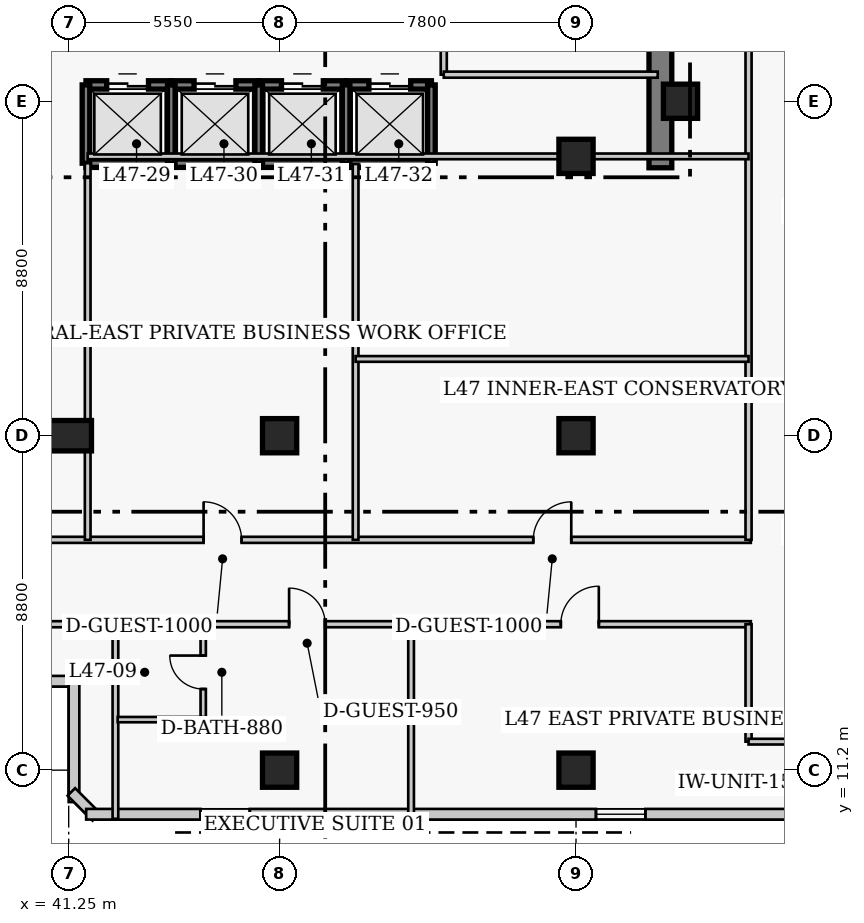
"""IFC4 building model, lengths in metres.
Left out: names, types, materials, properties, quantities, classifications, styles, units other than length and angle.
Written with IfcOpenShell. Run it as: python <this file> out.ifc"""

import sys

from ifc_helpers import new_model, si_unit, direction, frame, frame_2d, origin, origin_2d, place, context, subcontext, project, spatial, rectangle, extrude, element, fill, save


model = new_model("IFC4")
c1 = context("Model", 3, precision=1e-05, world=origin(), true_north=direction((0.0, 1.0)))
c2 = subcontext(c1, "Body", "Model", "MODEL_VIEW")
j1 = project(units=[si_unit("LENGTHUNIT", "METRE"), si_unit("PLANEANGLEUNIT", "RADIAN")], contexts=[c1])
p1 = place(None, origin())
s1 = spatial("IfcSite", under=j1, at=p1, CompositionType="ELEMENT")
p2 = place(p1, origin())
s2 = spatial("IfcBuilding", under=s1, at=p2, CompositionType="ELEMENT")
p3 = place(p2, frame((0.0, 0.0, 189.0)))
s3 = spatial("IfcBuildingStorey", under=s2, at=p3, CompositionType="ELEMENT", Elevation=189.0)
p4 = place(p3, frame((56.82, 27.05, 0.0), z_axis=(0.0, 0.0, 1.0), x_axis=(0.0, 1.0, 0.0)))
e1 = element("IfcWall", 1, at=p4, inside=s3, PredefinedType="SHEAR", context=c2, shape_type="SweptSolid", body=[
    extrude(rectangle(XDim=13.57, YDim=0.6, at=frame_2d((6.785, 0.0))), origin(), (0.0, 0.0, 1.0), 3.9),
])
p5 = place(p3, frame((41.25, 20.0, 0.0), z_axis=(0.0, 0.0, 1.0), x_axis=(1.0, 0.0, 0.0)))
e2 = element("IfcColumn", 2, at=p5, inside=s3, PredefinedType="COLUMN", context=c2, shape_type="SweptSolid", body=[
    extrude(rectangle(XDim=1.2, YDim=0.8, at=origin_2d()), origin(), (0.0, 0.0, 1.0), 3.9),
])
for number, where, z_axis, x_axis in (
    (3, (46.8, 11.2, 0.0), (0.0, 0.0, 1.0), (1.0, 0.0, 0.0)),
    (4, (46.8, 20.0, 0.0), (0.0, 0.0, 1.0), (1.0, 0.0, 0.0)),
    (5, (54.6, 11.2, 0.0), (0.0, 0.0, 1.0), (1.0, 0.0, 0.0)),
    (6, (54.6, 20.0, 0.0), (0.0, 0.0, 1.0), (1.0, 0.0, 0.0)),
    (7, (57.35, 28.8, 0.0), (0.0, 0.0, 1.0), (1.0, 0.0, 0.0)),
    (8, (54.6, 27.35, 0.0), (0.0, 0.0, 1.0), (1.0, 0.0, 0.0)),
):
    element("IfcColumn", number, at=place(p3, frame(where, z_axis=z_axis, x_axis=x_axis)), inside=s3, PredefinedType="COLUMN", context=c2, shape_type="SweptSolid", body=[
        extrude(rectangle(XDim=0.9, YDim=0.9, at=origin_2d()), origin(), (0.0, 0.0, 1.0), 3.9),
    ])
p6 = place(p3, frame((36.61, 13.54, 0.0), z_axis=(0.0, 0.0, 1.0), x_axis=(1.0, 0.0, 0.0)))
e9 = element("IfcWall", 9, at=p6, inside=s3, PredefinedType="SOLIDWALL", context=c2, shape_type="SweptSolid", body=[
    extrude(rectangle(XDim=4.78, YDim=0.28, at=frame_2d((2.39, 0.0))), origin(), (0.0, 0.0, 1.0), 3.65),
])
p7 = place(p6, frame((1.74, 0.0, 0.85)))
e10 = element("IfcOpeningElement", 10, at=p7, cuts=e9, PredefinedType="OPENING", context=c2, shape_type="SweptSolid", body=[
    extrude(rectangle(XDim=1.3, YDim=1.7, at=frame_2d((0.65, 0.85))), frame((0.0, 0.15, 0.0), z_axis=(0.0, -1.0, 0.0), x_axis=(1.0, 0.0, 0.0)), (0.0, 0.0, 1.0), 0.3),
])
p8 = place(p3, frame((41.39, 13.54, 0.0), z_axis=(0.0, 0.0, 1.0), x_axis=(0.0, -1.0, 0.0)))
e11 = element("IfcWall", 11, at=p8, inside=s3, PredefinedType="SOLIDWALL", context=c2, shape_type="SweptSolid", body=[
    extrude(rectangle(XDim=3.18, YDim=0.28, at=frame_2d((1.59, 0.0))), origin(), (0.0, 0.0, 1.0), 3.65),
])
p9 = place(p3, frame((41.321, 10.627, 0.0), z_axis=(0.0, 0.0, 1.0), x_axis=(0.707106781187, -0.707106781187, 0.0)))
e12 = element("IfcWall", 12, at=p9, inside=s3, PredefinedType="SOLIDWALL", context=c2, shape_type="SweptSolid", body=[
    extrude(rectangle(XDim=0.928, YDim=0.28, at=frame_2d((0.464, 0.0))), origin(), (0.0, 0.0, 1.0), 3.65),
])
p10 = place(p3, frame((41.71, 10.04, 0.0), z_axis=(0.0, 0.0, 1.0), x_axis=(1.0, 0.0, 0.0)))
e13 = element("IfcWall", 13, at=p10, inside=s3, PredefinedType="SOLIDWALL", context=c2, shape_type="SweptSolid", body=[
    extrude(rectangle(XDim=25.83, YDim=0.28, at=frame_2d((12.915, 0.0))), origin(), (0.0, 0.0, 1.0), 3.65),
])
p11 = place(p10, frame((3.005, 0.0, 0.85)))
e14 = element("IfcOpeningElement", 14, at=p11, cuts=e13, PredefinedType="OPENING", context=c2, shape_type="SweptSolid", body=[
    extrude(rectangle(XDim=1.3, YDim=1.7, at=frame_2d((0.65, 0.85))), frame((0.0, 0.15, 0.0), z_axis=(0.0, -1.0, 0.0), x_axis=(1.0, 0.0, 0.0)), (0.0, 0.0, 1.0), 0.3),
])
p12 = place(p10, frame((13.415, 0.0, 0.85)))
e15 = element("IfcOpeningElement", 15, at=p12, cuts=e13, PredefinedType="OPENING", context=c2, shape_type="SweptSolid", body=[
    extrude(rectangle(XDim=1.3, YDim=1.7, at=frame_2d((0.65, 0.85))), frame((0.0, 0.15, 0.0), z_axis=(0.0, -1.0, 0.0), x_axis=(1.0, 0.0, 0.0)), (0.0, 0.0, 1.0), 0.3),
])
p13 = place(p10, frame((21.525, 0.0, 0.85)))
e16 = element("IfcOpeningElement", 16, at=p13, cuts=e13, PredefinedType="OPENING", context=c2, shape_type="SweptSolid", body=[
    extrude(rectangle(XDim=1.3, YDim=1.7, at=frame_2d((0.65, 0.85))), frame((0.0, 0.15, 0.0), z_axis=(0.0, -1.0, 0.0), x_axis=(1.0, 0.0, 0.0)), (0.0, 0.0, 1.0), 0.3),
])
p14 = place(p3, frame((41.705, 29.23, 0.0), z_axis=(0.0, 0.0, 1.0), x_axis=(1.0, 0.0, 0.0)))
e17 = element("IfcWall", 17, at=p14, inside=s3, PredefinedType="SHEAR", context=c2, shape_type="SweptSolid", body=[
    extrude(rectangle(XDim=2.245, YDim=0.22, at=frame_2d((1.123, 0.0))), origin(), (0.0, 0.0, 1.0), 3.9),
])
p15 = place(p14, frame((0.545, 0.0, 0.0)))
e18 = element("IfcOpeningElement", 18, at=p15, cuts=e17, PredefinedType="OPENING", context=c2, shape_type="SweptSolid", body=[
    extrude(rectangle(XDim=1.1, YDim=2.15, at=frame_2d((0.55, 1.075))), frame((0.0, 0.12, 0.0), z_axis=(0.0, -1.0, 0.0), x_axis=(1.0, 0.0, 0.0)), (0.0, 0.0, 1.0), 0.24),
])
p16 = place(p3, frame((41.705, 27.17, 0.0), z_axis=(0.0, 0.0, 1.0), x_axis=(1.0, 0.0, 0.0)))
e19 = element("IfcWall", 19, at=p16, inside=s3, PredefinedType="SHEAR", context=c2, shape_type="SweptSolid", body=[
    extrude(rectangle(XDim=2.245, YDim=0.22, at=frame_2d((1.123, 0.0))), origin(), (0.0, 0.0, 1.0), 3.9),
])
p17 = place(p3, frame((41.705, 27.17, 0.0), z_axis=(0.0, 0.0, 1.0), x_axis=(0.0, 1.0, 0.0)))
e20 = element("IfcWall", 20, at=p17, inside=s3, PredefinedType="SHEAR", context=c2, shape_type="SweptSolid", body=[
    extrude(rectangle(XDim=2.06, YDim=0.2, at=frame_2d((1.03, 0.0))), origin(), (0.0, 0.0, 1.0), 3.9),
])
p18 = place(p3, frame((43.95, 29.23, 0.0), z_axis=(0.0, 0.0, 1.0), x_axis=(1.0, 0.0, 0.0)))
e21 = element("IfcWall", 21, at=p18, inside=s3, PredefinedType="SHEAR", context=c2, shape_type="SweptSolid", body=[
    extrude(rectangle(XDim=2.3, YDim=0.22, at=frame_2d((1.15, 0.0))), origin(), (0.0, 0.0, 1.0), 3.9),
])
p19 = place(p18, frame((0.6, 0.0, 0.0)))
e22 = element("IfcOpeningElement", 22, at=p19, cuts=e21, PredefinedType="OPENING", context=c2, shape_type="SweptSolid", body=[
    extrude(rectangle(XDim=1.1, YDim=2.15, at=frame_2d((0.55, 1.075))), frame((0.0, 0.12, 0.0), z_axis=(0.0, -1.0, 0.0), x_axis=(1.0, 0.0, 0.0)), (0.0, 0.0, 1.0), 0.24),
])
p20 = place(p3, frame((43.95, 27.17, 0.0), z_axis=(0.0, 0.0, 1.0), x_axis=(1.0, 0.0, 0.0)))
e23 = element("IfcWall", 23, at=p20, inside=s3, PredefinedType="SHEAR", context=c2, shape_type="SweptSolid", body=[
    extrude(rectangle(XDim=2.3, YDim=0.22, at=frame_2d((1.15, 0.0))), origin(), (0.0, 0.0, 1.0), 3.9),
])
p21 = place(p3, frame((43.95, 27.17, 0.0), z_axis=(0.0, 0.0, 1.0), x_axis=(0.0, 1.0, 0.0)))
e24 = element("IfcWall", 24, at=p21, inside=s3, PredefinedType="SHEAR", context=c2, shape_type="SweptSolid", body=[
    extrude(rectangle(XDim=2.06, YDim=0.2, at=frame_2d((1.03, 0.0))), origin(), (0.0, 0.0, 1.0), 3.9),
])
p22 = place(p3, frame((46.25, 29.23, 0.0), z_axis=(0.0, 0.0, 1.0), x_axis=(1.0, 0.0, 0.0)))
e25 = element("IfcWall", 25, at=p22, inside=s3, PredefinedType="SHEAR", context=c2, shape_type="SweptSolid", body=[
    extrude(rectangle(XDim=2.3, YDim=0.22, at=frame_2d((1.15, 0.0))), origin(), (0.0, 0.0, 1.0), 3.9),
])
p23 = place(p22, frame((0.6, 0.0, 0.0)))
e26 = element("IfcOpeningElement", 26, at=p23, cuts=e25, PredefinedType="OPENING", context=c2, shape_type="SweptSolid", body=[
    extrude(rectangle(XDim=1.1, YDim=2.15, at=frame_2d((0.55, 1.075))), frame((0.0, 0.12, 0.0), z_axis=(0.0, -1.0, 0.0), x_axis=(1.0, 0.0, 0.0)), (0.0, 0.0, 1.0), 0.24),
])
p24 = place(p3, frame((46.25, 27.17, 0.0), z_axis=(0.0, 0.0, 1.0), x_axis=(1.0, 0.0, 0.0)))
e27 = element("IfcWall", 27, at=p24, inside=s3, PredefinedType="SHEAR", context=c2, shape_type="SweptSolid", body=[
    extrude(rectangle(XDim=2.3, YDim=0.22, at=frame_2d((1.15, 0.0))), origin(), (0.0, 0.0, 1.0), 3.9),
])
p25 = place(p3, frame((46.25, 27.17, 0.0), z_axis=(0.0, 0.0, 1.0), x_axis=(0.0, 1.0, 0.0)))
e28 = element("IfcWall", 28, at=p25, inside=s3, PredefinedType="SHEAR", context=c2, shape_type="SweptSolid", body=[
    extrude(rectangle(XDim=2.06, YDim=0.2, at=frame_2d((1.03, 0.0))), origin(), (0.0, 0.0, 1.0), 3.9),
])
p26 = place(p3, frame((48.55, 29.23, 0.0), z_axis=(0.0, 0.0, 1.0), x_axis=(1.0, 0.0, 0.0)))
e29 = element("IfcWall", 29, at=p26, inside=s3, PredefinedType="SHEAR", context=c2, shape_type="SweptSolid", body=[
    extrude(rectangle(XDim=2.245, YDim=0.22, at=frame_2d((1.123, 0.0))), origin(), (0.0, 0.0, 1.0), 3.9),
])
p27 = place(p26, frame((0.6, 0.0, 0.0)))
e30 = element("IfcOpeningElement", 30, at=p27, cuts=e29, PredefinedType="OPENING", context=c2, shape_type="SweptSolid", body=[
    extrude(rectangle(XDim=1.1, YDim=2.15, at=frame_2d((0.55, 1.075))), frame((0.0, 0.12, 0.0), z_axis=(0.0, -1.0, 0.0), x_axis=(1.0, 0.0, 0.0)), (0.0, 0.0, 1.0), 0.24),
])
p28 = place(p3, frame((48.55, 27.17, 0.0), z_axis=(0.0, 0.0, 1.0), x_axis=(1.0, 0.0, 0.0)))
e31 = element("IfcWall", 31, at=p28, inside=s3, PredefinedType="SHEAR", context=c2, shape_type="SweptSolid", body=[
    extrude(rectangle(XDim=2.245, YDim=0.22, at=frame_2d((1.123, 0.0))), origin(), (0.0, 0.0, 1.0), 3.9),
])
for number, where, z_axis, x_axis in (
    (32, (48.55, 27.17, 0.0), (0.0, 0.0, 1.0), (0.0, 1.0, 0.0)),
    (33, (50.795, 27.17, 0.0), (0.0, 0.0, 1.0), (0.0, 1.0, 0.0)),
):
    element("IfcWall", number, at=place(p3, frame(where, z_axis=z_axis, x_axis=x_axis)), inside=s3, PredefinedType="SHEAR", context=c2, shape_type="SweptSolid", body=[
        extrude(rectangle(XDim=2.06, YDim=0.2, at=frame_2d((1.03, 0.0))), origin(), (0.0, 0.0, 1.0), 3.9),
    ])
p29 = place(p3, frame((51.12, 29.5, 0.0), z_axis=(0.0, 0.0, 1.0), x_axis=(0.0, 1.0, 0.0)))
e34 = element("IfcWall", 34, at=p29, inside=s3, PredefinedType="PARTITIONING", context=c2, shape_type="SweptSolid", body=[
    extrude(rectangle(XDim=3.7, YDim=0.16, at=frame_2d((1.85, 0.0))), origin(), (0.0, 0.0, 1.0), 3.65),
])
p30 = place(p29, frame((0.9, 0.0, 0.0)))
e35 = element("IfcOpeningElement", 35, at=p30, cuts=e34, PredefinedType="OPENING", context=c2, shape_type="SweptSolid", body=[
    extrude(rectangle(XDim=1.1, YDim=2.15, at=frame_2d((0.55, 1.075))), frame((0.0, 0.09, 0.0), z_axis=(0.0, -1.0, 0.0), x_axis=(1.0, 0.0, 0.0)), (0.0, 0.0, 1.0), 0.18),
])
p31 = place(p3, frame((51.12, 29.5, 0.0), z_axis=(0.0, 0.0, 1.0), x_axis=(1.0, 0.0, 0.0)))
e36 = element("IfcWall", 36, at=p31, inside=s3, PredefinedType="PARTITIONING", context=c2, shape_type="SweptSolid", body=[
    extrude(rectangle(XDim=5.63, YDim=0.16, at=frame_2d((2.815, 0.0))), origin(), (0.0, 0.0, 1.0), 3.65),
])
p32 = place(p3, frame((35.85, 17.26, 0.0), z_axis=(0.0, 0.0, 1.0), x_axis=(1.0, 0.0, 0.0)))
e37 = element("IfcWall", 37, at=p32, inside=s3, PredefinedType="PARTITIONING", context=c2, shape_type="SweptSolid", body=[
    extrude(rectangle(XDim=23.35, YDim=0.16, at=frame_2d((11.675, 0.0))), origin(), (0.0, 0.0, 1.0), 3.65),
])
p33 = place(p32, frame((8.95, 0.0, 0.0)))
e38 = element("IfcOpeningElement", 38, at=p33, cuts=e37, PredefinedType="OPENING", context=c2, shape_type="SweptSolid", body=[
    extrude(rectangle(XDim=1.0, YDim=2.15, at=frame_2d((0.5, 1.075))), frame((0.0, 0.09, 0.0), z_axis=(0.0, -1.0, 0.0), x_axis=(1.0, 0.0, 0.0)), (0.0, 0.0, 1.0), 0.18),
])
p34 = place(p32, frame((17.625, 0.0, 0.0)))
e39 = element("IfcOpeningElement", 39, at=p34, cuts=e37, PredefinedType="OPENING", context=c2, shape_type="SweptSolid", body=[
    extrude(rectangle(XDim=1.0, YDim=2.15, at=frame_2d((0.5, 1.075))), frame((0.0, 0.09, 0.0), z_axis=(0.0, -1.0, 0.0), x_axis=(1.0, 0.0, 0.0)), (0.0, 0.0, 1.0), 0.18),
])
p35 = place(p3, frame((35.8, 15.04, 0.0), z_axis=(0.0, 0.0, 1.0), x_axis=(1.0, 0.0, 0.0)))
e40 = element("IfcWall", 40, at=p35, inside=s3, PredefinedType="PARTITIONING", context=c2, shape_type="SweptSolid", body=[
    extrude(rectangle(XDim=23.4, YDim=0.16, at=frame_2d((11.7, 0.0))), origin(), (0.0, 0.0, 1.0), 3.65),
])
p36 = place(p35, frame((11.25, 0.0, 0.0)))
e41 = element("IfcOpeningElement", 41, at=p36, cuts=e40, PredefinedType="OPENING", context=c2, shape_type="SweptSolid", body=[
    extrude(rectangle(XDim=0.95, YDim=2.1, at=frame_2d((0.475, 1.05))), frame((0.0, 0.09, 0.0), z_axis=(0.0, -1.0, 0.0), x_axis=(1.0, 0.0, 0.0)), (0.0, 0.0, 1.0), 0.18),
])
p37 = place(p35, frame((18.4, 0.0, 0.0)))
e42 = element("IfcOpeningElement", 42, at=p37, cuts=e40, PredefinedType="OPENING", context=c2, shape_type="SweptSolid", body=[
    extrude(rectangle(XDim=1.0, YDim=2.15, at=frame_2d((0.5, 1.075))), frame((0.0, 0.09, 0.0), z_axis=(0.0, -1.0, 0.0), x_axis=(1.0, 0.0, 0.0)), (0.0, 0.0, 1.0), 0.18),
])
p38 = place(p3, frame((59.14, 17.26, 0.0), z_axis=(0.0, 0.0, 1.0), x_axis=(0.0, 1.0, 0.0)))
e43 = element("IfcWall", 43, at=p38, inside=s3, PredefinedType="PARTITIONING", context=c2, shape_type="SweptSolid", body=[
    extrude(rectangle(XDim=23.39, YDim=0.16, at=frame_2d((11.695, 0.0))), origin(), (0.0, 0.0, 1.0), 3.65),
])
p39 = place(p3, frame((59.14, 11.95, 0.0), z_axis=(0.0, 0.0, 1.0), x_axis=(0.0, 1.0, 0.0)))
e44 = element("IfcWall", 44, at=p39, inside=s3, PredefinedType="PARTITIONING", context=c2, shape_type="SweptSolid", body=[
    extrude(rectangle(XDim=3.09, YDim=0.16, at=frame_2d((1.545, 0.0))), origin(), (0.0, 0.0, 1.0), 3.65),
])
p40 = place(p3, frame((59.14, 11.95, 0.0), z_axis=(0.0, 0.0, 1.0), x_axis=(1.0, 0.0, 0.0)))
e45 = element("IfcWall", 45, at=p40, inside=s3, PredefinedType="PARTITIONING", context=c2, shape_type="SweptSolid", body=[
    extrude(rectangle(XDim=2.22, YDim=0.15, at=frame_2d((1.11, 0.0))), origin(), (0.0, 0.0, 1.0), 3.65),
])
p41 = place(p3, frame((41.75, 17.26, 0.0), z_axis=(0.0, 0.0, 1.0), x_axis=(0.0, 1.0, 0.0)))
e46 = element("IfcWall", 46, at=p41, inside=s3, PredefinedType="PARTITIONING", context=c2, shape_type="SweptSolid", body=[
    extrude(rectangle(XDim=9.91, YDim=0.15, at=frame_2d((4.955, 0.0))), origin(), (0.0, 0.0, 1.0), 3.65),
])
p42 = place(p3, frame((48.8, 17.26, 0.0), z_axis=(0.0, 0.0, 1.0), x_axis=(0.0, 1.0, 0.0)))
e47 = element("IfcWall", 47, at=p42, inside=s3, PredefinedType="PARTITIONING", context=c2, shape_type="SweptSolid", body=[
    extrude(rectangle(XDim=9.89, YDim=0.15, at=frame_2d((4.945, 0.0))), origin(), (0.0, 0.0, 1.0), 3.65),
])
p43 = place(p3, frame((41.75, 27.35, 0.0), z_axis=(0.0, 0.0, 1.0), x_axis=(1.0, 0.0, 0.0)))
e48 = element("IfcWall", 48, at=p43, inside=s3, PredefinedType="PARTITIONING", context=c2, shape_type="SweptSolid", body=[
    extrude(rectangle(XDim=17.39, YDim=0.15, at=frame_2d((8.695, 0.0))), origin(), (0.0, 0.0, 1.0), 3.65),
])
p44 = place(p3, frame((48.8, 22.02, 0.0), z_axis=(0.0, 0.0, 1.0), x_axis=(1.0, 0.0, 0.0)))
e49 = element("IfcWall", 49, at=p44, inside=s3, PredefinedType="PARTITIONING", context=c2, shape_type="SweptSolid", body=[
    extrude(rectangle(XDim=10.34, YDim=0.15, at=frame_2d((5.17, 0.0))), origin(), (0.0, 0.0, 1.0), 3.65),
])
p45 = place(p3, frame((42.48, 9.92, 0.0), z_axis=(0.0, 0.0, 1.0), x_axis=(0.0, 1.0, 0.0)))
e50 = element("IfcWall", 50, at=p45, inside=s3, PredefinedType="PARTITIONING", context=c2, shape_type="SweptSolid", body=[
    extrude(rectangle(XDim=5.12, YDim=0.15, at=frame_2d((2.56, 0.0))), origin(), (0.0, 0.0, 1.0), 3.65),
])
p46 = place(p3, frame((44.79, 12.53, 0.0), z_axis=(0.0, 0.0, 1.0), x_axis=(0.0, 1.0, 0.0)))
e51 = element("IfcWall", 51, at=p46, inside=s3, PredefinedType="PLUMBINGWALL", context=c2, shape_type="SweptSolid", body=[
    extrude(rectangle(XDim=2.49, YDim=0.14, at=frame_2d((1.245, 0.0))), origin(), (0.0, 0.0, 1.0), 3.65),
])
p47 = place(p46, frame((0.805, 0.0, 0.0)))
e52 = element("IfcOpeningElement", 52, at=p47, cuts=e51, PredefinedType="OPENING", context=c2, shape_type="SweptSolid", body=[
    extrude(rectangle(XDim=0.88, YDim=2.05, at=frame_2d((0.44, 1.025))), frame((0.0, 0.08, 0.0), z_axis=(0.0, -1.0, 0.0), x_axis=(1.0, 0.0, 0.0)), (0.0, 0.0, 1.0), 0.16),
])
p48 = place(p3, frame((42.54, 12.53, 0.0), z_axis=(0.0, 0.0, 1.0), x_axis=(1.0, 0.0, 0.0)))
e53 = element("IfcWall", 53, at=p48, inside=s3, PredefinedType="PLUMBINGWALL", context=c2, shape_type="SweptSolid", body=[
    extrude(rectangle(XDim=2.25, YDim=0.14, at=frame_2d((1.125, 0.0))), origin(), (0.0, 0.0, 1.0), 3.65),
])
p49 = place(p3, frame((50.26, 9.92, 0.0), z_axis=(0.0, 0.0, 1.0), x_axis=(0.0, 1.0, 0.0)))
e54 = element("IfcWall", 54, at=p49, inside=s3, PredefinedType="PARTITIONING", context=c2, shape_type="SweptSolid", body=[
    extrude(rectangle(XDim=5.12, YDim=0.15, at=frame_2d((2.56, 0.0))), origin(), (0.0, 0.0, 1.0), 3.65),
])
p50 = place(p11, origin())
e55 = element("IfcWindow", 55, at=p50, inside=s3, PartitioningType="SINGLE_PANEL", PredefinedType="WINDOW", context=c2, shape_type="SweptSolid", body=[
    extrude(rectangle(XDim=1.3, YDim=1.7, at=frame_2d((0.65, 0.85))), frame((0.0, 0.03, 0.0), z_axis=(0.0, -1.0, 0.0), x_axis=(1.0, 0.0, 0.0)), (0.0, 0.0, 1.0), 0.06),
])
fill(e14, e55)
p51 = place(p12, origin())
e56 = element("IfcWindow", 56, at=p51, inside=s3, PartitioningType="SINGLE_PANEL", PredefinedType="WINDOW", context=c2, shape_type="SweptSolid", body=[
    extrude(rectangle(XDim=1.3, YDim=1.7, at=frame_2d((0.65, 0.85))), frame((0.0, 0.03, 0.0), z_axis=(0.0, -1.0, 0.0), x_axis=(1.0, 0.0, 0.0)), (0.0, 0.0, 1.0), 0.06),
])
fill(e15, e56)
p52 = place(p15, origin())
e57 = element("IfcDoor", 57, at=p52, inside=s3, OperationType="DOUBLE_DOOR_SLIDING", PredefinedType="DOOR", context=c2, shape_type="SweptSolid", body=[
    extrude(rectangle(XDim=1.1, YDim=2.15, at=frame_2d((0.55, 1.075))), frame((0.0, 0.025, 0.0), z_axis=(0.0, -1.0, 0.0), x_axis=(1.0, 0.0, 0.0)), (0.0, 0.0, 1.0), 0.05),
])
fill(e18, e57)
p53 = place(p19, origin())
e58 = element("IfcDoor", 58, at=p53, inside=s3, OperationType="DOUBLE_DOOR_SLIDING", PredefinedType="DOOR", context=c2, shape_type="SweptSolid", body=[
    extrude(rectangle(XDim=1.1, YDim=2.15, at=frame_2d((0.55, 1.075))), frame((0.0, 0.025, 0.0), z_axis=(0.0, -1.0, 0.0), x_axis=(1.0, 0.0, 0.0)), (0.0, 0.0, 1.0), 0.05),
])
fill(e22, e58)
p54 = place(p23, origin())
e59 = element("IfcDoor", 59, at=p54, inside=s3, OperationType="DOUBLE_DOOR_SLIDING", PredefinedType="DOOR", context=c2, shape_type="SweptSolid", body=[
    extrude(rectangle(XDim=1.1, YDim=2.15, at=frame_2d((0.55, 1.075))), frame((0.0, 0.025, 0.0), z_axis=(0.0, -1.0, 0.0), x_axis=(1.0, 0.0, 0.0)), (0.0, 0.0, 1.0), 0.05),
])
fill(e26, e59)
p55 = place(p27, origin())
e60 = element("IfcDoor", 60, at=p55, inside=s3, OperationType="DOUBLE_DOOR_SLIDING", PredefinedType="DOOR", context=c2, shape_type="SweptSolid", body=[
    extrude(rectangle(XDim=1.1, YDim=2.15, at=frame_2d((0.55, 1.075))), frame((0.0, 0.025, 0.0), z_axis=(0.0, -1.0, 0.0), x_axis=(1.0, 0.0, 0.0)), (0.0, 0.0, 1.0), 0.05),
])
fill(e30, e60)
p56 = place(p33, origin())
e61 = element("IfcDoor", 61, at=p56, inside=s3, OperationType="SINGLE_SWING_LEFT", PredefinedType="DOOR", context=c2, shape_type="SweptSolid", body=[
    extrude(rectangle(XDim=1.0, YDim=2.15, at=frame_2d((0.5, 1.075))), frame((0.0, 0.025, 0.0), z_axis=(0.0, -1.0, 0.0), x_axis=(1.0, 0.0, 0.0)), (0.0, 0.0, 1.0), 0.05),
])
fill(e38, e61)
p57 = place(p34, origin())
e62 = element("IfcDoor", 62, at=p57, inside=s3, OperationType="SINGLE_SWING_RIGHT", PredefinedType="DOOR", context=c2, shape_type="SweptSolid", body=[
    extrude(rectangle(XDim=1.0, YDim=2.15, at=frame_2d((0.5, 1.075))), frame((0.0, 0.025, 0.0), z_axis=(0.0, -1.0, 0.0), x_axis=(1.0, 0.0, 0.0)), (0.0, 0.0, 1.0), 0.05),
])
fill(e39, e62)
p58 = place(p47, origin())
e63 = element("IfcDoor", 63, at=p58, inside=s3, OperationType="SINGLE_SWING_RIGHT", PredefinedType="DOOR", context=c2, shape_type="SweptSolid", body=[
    extrude(rectangle(XDim=0.88, YDim=2.05, at=frame_2d((0.44, 1.025))), frame((0.0, 0.025, 0.0), z_axis=(0.0, -1.0, 0.0), x_axis=(1.0, 0.0, 0.0)), (0.0, 0.0, 1.0), 0.05),
])
fill(e52, e63)
p59 = place(p36, origin())
e64 = element("IfcDoor", 64, at=p59, inside=s3, OperationType="SINGLE_SWING_LEFT", PredefinedType="DOOR", context=c2, shape_type="SweptSolid", body=[
    extrude(rectangle(XDim=0.95, YDim=2.1, at=frame_2d((0.475, 1.05))), frame((0.0, 0.025, 0.0), z_axis=(0.0, -1.0, 0.0), x_axis=(1.0, 0.0, 0.0)), (0.0, 0.0, 1.0), 0.05),
])
fill(e41, e64)
p60 = place(p37, origin())
e65 = element("IfcDoor", 65, at=p60, inside=s3, OperationType="SINGLE_SWING_RIGHT", PredefinedType="DOOR", context=c2, shape_type="SweptSolid", body=[
    extrude(rectangle(XDim=1.0, YDim=2.15, at=frame_2d((0.5, 1.075))), frame((0.0, 0.025, 0.0), z_axis=(0.0, -1.0, 0.0), x_axis=(1.0, 0.0, 0.0)), (0.0, 0.0, 1.0), 0.05),
])
fill(e42, e65)
save(model, sys.argv[1])
